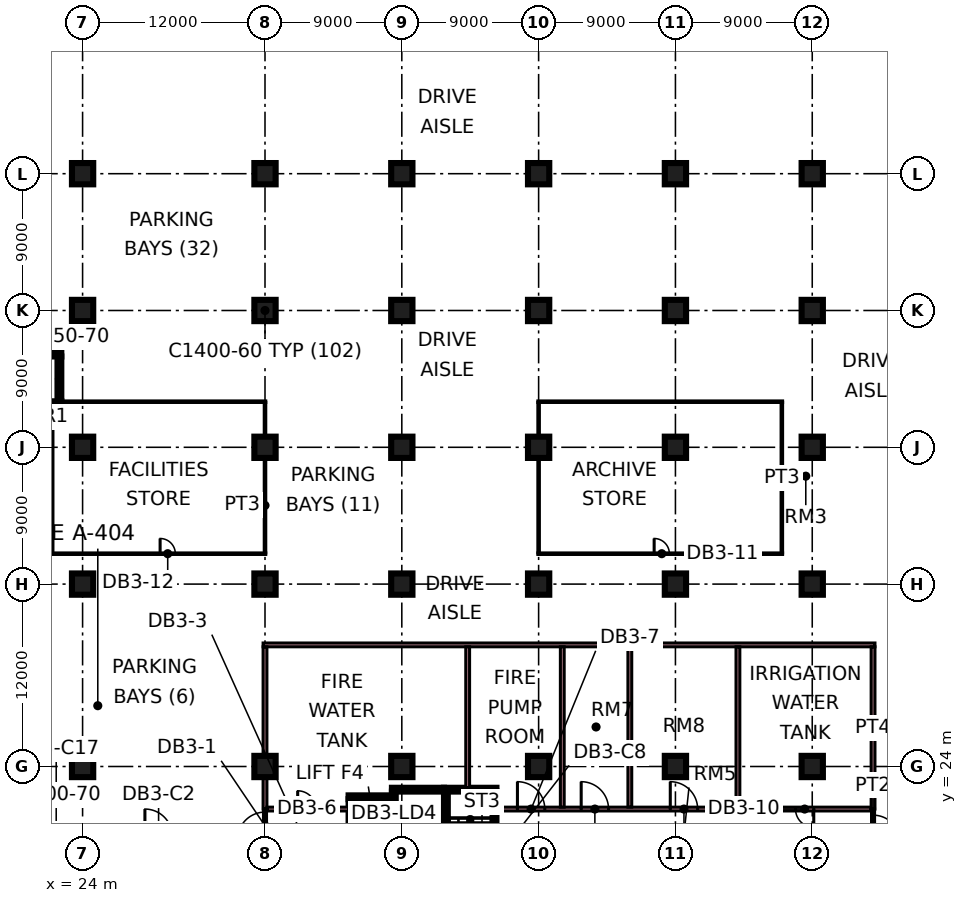
"""IFC4 building model, lengths in metres.
Left out: names, types, materials, properties, quantities, classifications, styles, units other than length and angle.
Written with IfcOpenShell. Run it as: python <this file> out.ifc"""

import sys

from ifc_helpers import new_model, si_unit, direction, frame, frame_2d, origin, origin_2d, place, context, subcontext, project, spatial, rectangle, extrude, element, fill, save


model = new_model("IFC4")
c1 = context("Model", 3, precision=1e-05, world=origin(), true_north=direction((0.0, 1.0)))
c2 = subcontext(c1, "Body", "Model", "MODEL_VIEW")
j1 = project(units=[si_unit("LENGTHUNIT", "METRE"), si_unit("PLANEANGLEUNIT", "RADIAN")], contexts=[c1])
p1 = place(None, origin())
s1 = spatial("IfcSite", under=j1, at=p1, CompositionType="ELEMENT")
p2 = place(p1, origin())
s2 = spatial("IfcBuilding", under=s1, at=p2, CompositionType="ELEMENT")
p3 = place(p2, frame((0.0, 0.0, -13.5)))
s3 = spatial("IfcBuildingStorey", under=s2, at=p3, CompositionType="ELEMENT", Elevation=-13.5)
for number, where, z_axis, x_axis in (
    (1, (24.0, 24.0, 0.0), (0.0, 0.0, 1.0), (1.0, 0.0, 0.0)),
    (2, (24.0, 36.0, 0.0), (0.0, 0.0, 1.0), (1.0, 0.0, 0.0)),
    (3, (24.0, 45.0, 0.0), (0.0, 0.0, 1.0), (1.0, 0.0, 0.0)),
    (4, (24.0, 54.0, 0.0), (0.0, 0.0, 1.0), (1.0, 0.0, 0.0)),
    (5, (24.0, 63.0, 0.0), (0.0, 0.0, 1.0), (1.0, 0.0, 0.0)),
    (6, (36.0, 24.0, 0.0), (0.0, 0.0, 1.0), (1.0, 0.0, 0.0)),
    (7, (36.0, 36.0, 0.0), (0.0, 0.0, 1.0), (1.0, 0.0, 0.0)),
    (8, (36.0, 45.0, 0.0), (0.0, 0.0, 1.0), (1.0, 0.0, 0.0)),
    (9, (36.0, 54.0, 0.0), (0.0, 0.0, 1.0), (1.0, 0.0, 0.0)),
    (10, (36.0, 63.0, 0.0), (0.0, 0.0, 1.0), (1.0, 0.0, 0.0)),
    (11, (45.0, 24.0, 0.0), (0.0, 0.0, 1.0), (1.0, 0.0, 0.0)),
    (12, (45.0, 36.0, 0.0), (0.0, 0.0, 1.0), (1.0, 0.0, 0.0)),
    (13, (45.0, 45.0, 0.0), (0.0, 0.0, 1.0), (1.0, 0.0, 0.0)),
    (14, (45.0, 54.0, 0.0), (0.0, 0.0, 1.0), (1.0, 0.0, 0.0)),
    (15, (45.0, 63.0, 0.0), (0.0, 0.0, 1.0), (1.0, 0.0, 0.0)),
    (16, (54.0, 24.0, 0.0), (0.0, 0.0, 1.0), (1.0, 0.0, 0.0)),
    (17, (54.0, 36.0, 0.0), (0.0, 0.0, 1.0), (1.0, 0.0, 0.0)),
    (18, (54.0, 45.0, 0.0), (0.0, 0.0, 1.0), (1.0, 0.0, 0.0)),
    (19, (54.0, 54.0, 0.0), (0.0, 0.0, 1.0), (1.0, 0.0, 0.0)),
    (20, (54.0, 63.0, 0.0), (0.0, 0.0, 1.0), (1.0, 0.0, 0.0)),
    (21, (63.0, 24.0, 0.0), (0.0, 0.0, 1.0), (1.0, 0.0, 0.0)),
    (22, (63.0, 36.0, 0.0), (0.0, 0.0, 1.0), (1.0, 0.0, 0.0)),
    (23, (63.0, 45.0, 0.0), (0.0, 0.0, 1.0), (1.0, 0.0, 0.0)),
    (24, (63.0, 54.0, 0.0), (0.0, 0.0, 1.0), (1.0, 0.0, 0.0)),
    (25, (63.0, 63.0, 0.0), (0.0, 0.0, 1.0), (1.0, 0.0, 0.0)),
    (26, (72.0, 24.0, 0.0), (0.0, 0.0, 1.0), (1.0, 0.0, 0.0)),
    (27, (72.0, 36.0, 0.0), (0.0, 0.0, 1.0), (1.0, 0.0, 0.0)),
    (28, (72.0, 45.0, 0.0), (0.0, 0.0, 1.0), (1.0, 0.0, 0.0)),
    (29, (72.0, 54.0, 0.0), (0.0, 0.0, 1.0), (1.0, 0.0, 0.0)),
    (30, (72.0, 63.0, 0.0), (0.0, 0.0, 1.0), (1.0, 0.0, 0.0)),
):
    element("IfcColumn", number, at=place(p3, frame(where, z_axis=z_axis, x_axis=x_axis)), inside=s3, PredefinedType="COLUMN", context=c2, shape_type="SweptSolid", body=[
        extrude(rectangle(XDim=1.4, YDim=1.4, at=origin_2d()), origin(), (0.0, 0.0, 1.0), 4.5),
    ])
p4 = place(p3, frame((47.775, 22.475, 0.0), z_axis=(0.0, 0.0, 1.0), x_axis=(1.0, 0.0, 0.0)))
e31 = element("IfcWall", 31, at=p4, inside=s3, PredefinedType="SHEAR", context=c2, shape_type="SweptSolid", body=[
    extrude(rectangle(XDim=3.45, YDim=0.25, at=frame_2d((1.725, 0.0))), origin(), (0.0, 0.0, 1.0), 4.5),
])
p5 = place(p3, frame((47.9, 15.85, 0.0), z_axis=(0.0, 0.0, 1.0), x_axis=(0.0, 1.0, 0.0)))
e32 = element("IfcWall", 32, at=p5, inside=s3, PredefinedType="SHEAR", context=c2, shape_type="SweptSolid", body=[
    extrude(rectangle(XDim=6.5, YDim=0.25, at=frame_2d((3.25, 0.0))), origin(), (0.0, 0.0, 1.0), 4.5),
])
p6 = place(p5, frame((0.35, 0.0, 0.0)))
e33 = element("IfcOpeningElement", 33, at=p6, cuts=e32, PredefinedType="OPENING", context=c2, shape_type="SweptSolid", body=[
    extrude(rectangle(XDim=1.1, YDim=2.2, at=frame_2d((0.55, 1.1))), frame((0.0, 0.135, 0.0), z_axis=(0.0, -1.0, 0.0), x_axis=(1.0, 0.0, 0.0)), (0.0, 0.0, 1.0), 0.27),
])
p7 = place(p3, frame((51.1, 15.85, 0.0), z_axis=(0.0, 0.0, 1.0), x_axis=(0.0, 1.0, 0.0)))
e34 = element("IfcWall", 34, at=p7, inside=s3, PredefinedType="SHEAR", context=c2, shape_type="SweptSolid", body=[
    extrude(rectangle(XDim=6.5, YDim=0.25, at=frame_2d((3.25, 0.0))), origin(), (0.0, 0.0, 1.0), 4.5),
])
for number, where, z_axis, x_axis in (
    (35, (15.6, 47.9, 0.0), (0.0, 0.0, 1.0), (1.0, 0.0, 0.0)),
    (36, (15.6, 51.1, 0.0), (0.0, 0.0, 1.0), (1.0, 0.0, 0.0)),
):
    element("IfcWall", number, at=place(p3, frame(where, z_axis=z_axis, x_axis=x_axis)), inside=s3, PredefinedType="SHEAR", context=c2, shape_type="SweptSolid", body=[
        extrude(rectangle(XDim=7.0, YDim=0.25, at=frame_2d((3.5, 0.0))), origin(), (0.0, 0.0, 1.0), 4.5),
    ])
p8 = place(p3, frame((22.475, 48.025, 0.0), z_axis=(0.0, 0.0, 1.0), x_axis=(0.0, 1.0, 0.0)))
e37 = element("IfcWall", 37, at=p8, inside=s3, PredefinedType="SHEAR", context=c2, shape_type="SweptSolid", body=[
    extrude(rectangle(XDim=2.95, YDim=0.25, at=frame_2d((1.475, 0.0))), origin(), (0.0, 0.0, 1.0), 4.5),
])
p9 = place(p3, frame((44.35, 22.475, 0.0), z_axis=(0.0, 0.0, 1.0), x_axis=(1.0, 0.0, 0.0)))
e38 = element("IfcWall", 38, at=p9, inside=s3, PredefinedType="SHEAR", context=c2, shape_type="SweptSolid", body=[
    extrude(rectangle(XDim=3.425, YDim=0.25, at=frame_2d((1.712, 0.0))), origin(), (0.0, 0.0, 1.0), 4.5),
])
p10 = place(p3, frame((44.475, 15.85, 0.0), z_axis=(0.0, 0.0, 1.0), x_axis=(0.0, 1.0, 0.0)))
e39 = element("IfcWall", 39, at=p10, inside=s3, PredefinedType="SHEAR", context=c2, shape_type="SweptSolid", body=[
    extrude(rectangle(XDim=6.5, YDim=0.25, at=frame_2d((3.25, 0.0))), origin(), (0.0, 0.0, 1.0), 4.5),
])
p11 = place(p10, frame((1.75, 0.0, 0.0)))
e40 = element("IfcOpeningElement", 40, at=p11, cuts=e39, PredefinedType="OPENING", context=c2, shape_type="SweptSolid", body=[
    extrude(rectangle(XDim=1.1, YDim=2.2, at=frame_2d((0.55, 1.1))), frame((0.0, 0.135, 0.0), z_axis=(0.0, -1.0, 0.0), x_axis=(1.0, 0.0, 0.0)), (0.0, 0.0, 1.0), 0.27),
])
p12 = place(p10, frame((4.3, 0.0, 0.0)))
e41 = element("IfcOpeningElement", 41, at=p12, cuts=e39, PredefinedType="OPENING", context=c2, shape_type="SweptSolid", body=[
    extrude(rectangle(XDim=1.1, YDim=2.2, at=frame_2d((0.55, 1.1))), frame((0.0, 0.135, 0.0), z_axis=(0.0, -1.0, 0.0), x_axis=(1.0, 0.0, 0.0)), (0.0, 0.0, 1.0), 0.27),
])
p13 = place(p3, frame((41.5, 21.975, 0.0), z_axis=(0.0, 0.0, 1.0), x_axis=(1.0, 0.0, 0.0)))
e42 = element("IfcWall", 42, at=p13, inside=s3, PredefinedType="SHEAR", context=c2, shape_type="SweptSolid", body=[
    extrude(rectangle(XDim=2.85, YDim=0.25, at=frame_2d((1.425, 0.0))), origin(), (0.0, 0.0, 1.0), 4.5),
])
p14 = place(p3, frame((41.625, 19.55, 0.0), z_axis=(0.0, 0.0, 1.0), x_axis=(0.0, 1.0, 0.0)))
e43 = element("IfcWall", 43, at=p14, inside=s3, PredefinedType="SHEAR", context=c2, shape_type="SweptSolid", body=[
    extrude(rectangle(XDim=2.3, YDim=0.25, at=frame_2d((1.15, 0.0))), origin(), (0.0, 0.0, 1.0), 4.5),
])
p15 = place(p3, frame((21.95, 38.0, 0.0), z_axis=(0.0, 0.0, 1.0), x_axis=(1.0, 0.0, 0.0)))
e44 = element("IfcWall", 44, at=p15, inside=s3, PredefinedType="PARTITIONING", context=c2, shape_type="SweptSolid", body=[
    extrude(rectangle(XDim=14.1, YDim=0.1, at=frame_2d((7.05, 0.0))), origin(), (0.0, 0.0, 1.0), 4.05),
])
p16 = place(p15, frame((7.15, 0.0, 0.0)))
e45 = element("IfcOpeningElement", 45, at=p16, cuts=e44, PredefinedType="OPENING", context=c2, shape_type="SweptSolid", body=[
    extrude(rectangle(XDim=1.0, YDim=2.1, at=frame_2d((0.5, 1.05))), frame((0.0, 0.06, 0.0), z_axis=(0.0, -1.0, 0.0), x_axis=(1.0, 0.0, 0.0)), (0.0, 0.0, 1.0), 0.12),
])
p17 = place(p3, frame((22.0, 38.05, 0.0), z_axis=(0.0, 0.0, 1.0), x_axis=(0.0, 1.0, 0.0)))
e46 = element("IfcWall", 46, at=p17, inside=s3, PredefinedType="PARTITIONING", context=c2, shape_type="SweptSolid", body=[
    extrude(rectangle(XDim=9.725, YDim=0.1, at=frame_2d((4.862, 0.0))), origin(), (0.0, 0.0, 1.0), 4.05),
])
p18 = place(p3, frame((22.6, 48.0, 0.0), z_axis=(0.0, 0.0, 1.0), x_axis=(1.0, 0.0, 0.0)))
e47 = element("IfcWall", 47, at=p18, inside=s3, PredefinedType="PARTITIONING", context=c2, shape_type="SweptSolid", body=[
    extrude(rectangle(XDim=13.45, YDim=0.1, at=frame_2d((6.725, 0.0))), origin(), (0.0, 0.0, 1.0), 4.05),
])
p19 = place(p3, frame((35.875, 32.0, 0.0), z_axis=(0.0, 0.0, 1.0), x_axis=(1.0, 0.0, 0.0)))
e48 = element("IfcWall", 48, at=p19, inside=s3, PredefinedType="PARTITIONING", context=c2, shape_type="SweptSolid", body=[
    extrude(rectangle(XDim=40.25, YDim=0.25, at=frame_2d((20.125, 0.0))), origin(), (0.0, 0.0, 1.0), 4.05),
])
p20 = place(p3, frame((36.0, 18.8, 0.0), z_axis=(0.0, 0.0, 1.0), x_axis=(0.0, 1.0, 0.0)))
e49 = element("IfcWall", 49, at=p20, inside=s3, PredefinedType="PARTITIONING", context=c2, shape_type="SweptSolid", body=[
    extrude(rectangle(XDim=2.4, YDim=0.2, at=frame_2d((1.2, 0.0))), origin(), (0.0, 0.0, 1.0), 4.05),
])
p21 = place(p20, frame((0.4, 0.0, 0.0)))
e50 = element("IfcOpeningElement", 50, at=p21, cuts=e49, PredefinedType="OPENING", context=c2, shape_type="SweptSolid", body=[
    extrude(rectangle(XDim=1.8, YDim=2.1, at=frame_2d((0.9, 1.05))), frame((0.0, 0.11, 0.0), z_axis=(0.0, -1.0, 0.0), x_axis=(1.0, 0.0, 0.0)), (0.0, 0.0, 1.0), 0.22),
])
p22 = place(p3, frame((36.0, 21.2, 0.0), z_axis=(0.0, 0.0, 1.0), x_axis=(0.0, 1.0, 0.0)))
e51 = element("IfcWall", 51, at=p22, inside=s3, PredefinedType="PARTITIONING", context=c2, shape_type="SweptSolid", body=[
    extrude(rectangle(XDim=2.101, YDim=0.25, at=frame_2d((1.051, 0.0))), origin(), (0.0, 0.0, 1.0), 4.05),
])
p23 = place(p3, frame((36.0, 24.699, 0.0), z_axis=(0.0, 0.0, 1.0), x_axis=(0.0, 1.0, 0.0)))
e52 = element("IfcWall", 52, at=p23, inside=s3, PredefinedType="PARTITIONING", context=c2, shape_type="SweptSolid", body=[
    extrude(rectangle(XDim=7.176, YDim=0.25, at=frame_2d((3.588, 0.0))), origin(), (0.0, 0.0, 1.0), 4.05),
])
p24 = place(p3, frame((36.0, 38.05, 0.0), z_axis=(0.0, 0.0, 1.0), x_axis=(0.0, 1.0, 0.0)))
e53 = element("IfcWall", 53, at=p24, inside=s3, PredefinedType="PARTITIONING", context=c2, shape_type="SweptSolid", body=[
    extrude(rectangle(XDim=6.251, YDim=0.1, at=frame_2d((3.125, 0.0))), origin(), (0.0, 0.0, 1.0), 4.05),
])
p25 = place(p3, frame((36.0, 45.699, 0.0), z_axis=(0.0, 0.0, 1.0), x_axis=(0.0, 1.0, 0.0)))
e54 = element("IfcWall", 54, at=p25, inside=s3, PredefinedType="PARTITIONING", context=c2, shape_type="SweptSolid", body=[
    extrude(rectangle(XDim=2.251, YDim=0.1, at=frame_2d((1.125, 0.0))), origin(), (0.0, 0.0, 1.0), 4.05),
])
p26 = place(p3, frame((36.125, 21.2, 0.0), z_axis=(0.0, 0.0, 1.0), x_axis=(1.0, 0.0, 0.0)))
e55 = element("IfcWall", 55, at=p26, inside=s3, PredefinedType="PARTITIONING", context=c2, shape_type="SweptSolid", body=[
    extrude(rectangle(XDim=5.375, YDim=0.25, at=frame_2d((2.688, 0.0))), origin(), (0.0, 0.0, 1.0), 4.05),
])
p27 = place(p26, frame((2.025, 0.0, 0.0)))
e56 = element("IfcOpeningElement", 56, at=p27, cuts=e55, PredefinedType="OPENING", context=c2, shape_type="SweptSolid", body=[
    extrude(rectangle(XDim=1.2, YDim=2.1, at=frame_2d((0.6, 1.05))), frame((0.0, 0.135, 0.0), z_axis=(0.0, -1.0, 0.0), x_axis=(1.0, 0.0, 0.0)), (0.0, 0.0, 1.0), 0.27),
])
p28 = place(p3, frame((49.333, 22.6, 0.0), z_axis=(0.0, 0.0, 1.0), x_axis=(0.0, 1.0, 0.0)))
e57 = element("IfcWall", 57, at=p28, inside=s3, PredefinedType="PARTITIONING", context=c2, shape_type="SweptSolid", body=[
    extrude(rectangle(XDim=9.275, YDim=0.25, at=frame_2d((4.637, 0.0))), origin(), (0.0, 0.0, 1.0), 4.05),
])
p29 = place(p3, frame((51.225, 21.2, 0.0), z_axis=(0.0, 0.0, 1.0), x_axis=(1.0, 0.0, 0.0)))
e58 = element("IfcWall", 58, at=p29, inside=s3, PredefinedType="PARTITIONING", context=c2, shape_type="SweptSolid", body=[
    extrude(rectangle(XDim=24.65, YDim=0.25, at=frame_2d((12.325, 0.0))), origin(), (0.0, 0.0, 1.0), 4.05),
])
p30 = place(p29, frame((1.381, 0.0, 0.0)))
e59 = element("IfcOpeningElement", 59, at=p30, cuts=e58, PredefinedType="OPENING", context=c2, shape_type="SweptSolid", body=[
    extrude(rectangle(XDim=1.8, YDim=2.1, at=frame_2d((0.9, 1.05))), frame((0.0, 0.135, 0.0), z_axis=(0.0, -1.0, 0.0), x_axis=(1.0, 0.0, 0.0)), (0.0, 0.0, 1.0), 0.27),
])
p31 = place(p29, frame((5.575, 0.0, 0.0)))
e60 = element("IfcOpeningElement", 60, at=p31, cuts=e58, PredefinedType="OPENING", context=c2, shape_type="SweptSolid", body=[
    extrude(rectangle(XDim=1.8, YDim=2.1, at=frame_2d((0.9, 1.05))), frame((0.0, 0.135, 0.0), z_axis=(0.0, -1.0, 0.0), x_axis=(1.0, 0.0, 0.0)), (0.0, 0.0, 1.0), 0.27),
])
p32 = place(p29, frame((11.436, 0.0, 0.0)))
e61 = element("IfcOpeningElement", 61, at=p32, cuts=e58, PredefinedType="OPENING", context=c2, shape_type="SweptSolid", body=[
    extrude(rectangle(XDim=1.8, YDim=2.1, at=frame_2d((0.9, 1.05))), frame((0.0, 0.135, 0.0), z_axis=(0.0, -1.0, 0.0), x_axis=(1.0, 0.0, 0.0)), (0.0, 0.0, 1.0), 0.27),
])
p33 = place(p29, frame((19.675, 0.0, 0.0)))
e62 = element("IfcOpeningElement", 62, at=p33, cuts=e58, PredefinedType="OPENING", context=c2, shape_type="SweptSolid", body=[
    extrude(rectangle(XDim=1.2, YDim=2.1, at=frame_2d((0.6, 1.05))), frame((0.0, 0.135, 0.0), z_axis=(0.0, -1.0, 0.0), x_axis=(1.0, 0.0, 0.0)), (0.0, 0.0, 1.0), 0.27),
])
p34 = place(p3, frame((53.95, 38.0, 0.0), z_axis=(0.0, 0.0, 1.0), x_axis=(1.0, 0.0, 0.0)))
e63 = element("IfcWall", 63, at=p34, inside=s3, PredefinedType="PARTITIONING", context=c2, shape_type="SweptSolid", body=[
    extrude(rectangle(XDim=16.1, YDim=0.1, at=frame_2d((8.05, 0.0))), origin(), (0.0, 0.0, 1.0), 4.05),
])
p35 = place(p34, frame((7.65, 0.0, 0.0)))
e64 = element("IfcOpeningElement", 64, at=p35, cuts=e63, PredefinedType="OPENING", context=c2, shape_type="SweptSolid", body=[
    extrude(rectangle(XDim=1.0, YDim=2.1, at=frame_2d((0.5, 1.05))), frame((0.0, 0.06, 0.0), z_axis=(0.0, -1.0, 0.0), x_axis=(1.0, 0.0, 0.0)), (0.0, 0.0, 1.0), 0.12),
])
p36 = place(p3, frame((53.95, 48.0, 0.0), z_axis=(0.0, 0.0, 1.0), x_axis=(1.0, 0.0, 0.0)))
e65 = element("IfcWall", 65, at=p36, inside=s3, PredefinedType="PARTITIONING", context=c2, shape_type="SweptSolid", body=[
    extrude(rectangle(XDim=16.1, YDim=0.1, at=frame_2d((8.05, 0.0))), origin(), (0.0, 0.0, 1.0), 4.05),
])
p37 = place(p3, frame((54.0, 38.05, 0.0), z_axis=(0.0, 0.0, 1.0), x_axis=(0.0, 1.0, 0.0)))
e66 = element("IfcWall", 66, at=p37, inside=s3, PredefinedType="PARTITIONING", context=c2, shape_type="SweptSolid", body=[
    extrude(rectangle(XDim=6.251, YDim=0.1, at=frame_2d((3.125, 0.0))), origin(), (0.0, 0.0, 1.0), 4.05),
])
p38 = place(p3, frame((54.0, 45.699, 0.0), z_axis=(0.0, 0.0, 1.0), x_axis=(0.0, 1.0, 0.0)))
e67 = element("IfcWall", 67, at=p38, inside=s3, PredefinedType="PARTITIONING", context=c2, shape_type="SweptSolid", body=[
    extrude(rectangle(XDim=2.251, YDim=0.1, at=frame_2d((1.125, 0.0))), origin(), (0.0, 0.0, 1.0), 4.05),
])
for number, where, z_axis, x_axis in (
    (68, (55.556, 21.325, 0.0), (0.0, 0.0, 1.0), (0.0, 1.0, 0.0)),
    (69, (60.0, 21.325, 0.0), (0.0, 0.0, 1.0), (0.0, 1.0, 0.0)),
    (70, (67.111, 21.325, 0.0), (0.0, 0.0, 1.0), (0.0, 1.0, 0.0)),
):
    element("IfcWall", number, at=place(p3, frame(where, z_axis=z_axis, x_axis=x_axis)), inside=s3, PredefinedType="PARTITIONING", context=c2, shape_type="SweptSolid", body=[
        extrude(rectangle(XDim=10.55, YDim=0.25, at=frame_2d((5.275, 0.0))), origin(), (0.0, 0.0, 1.0), 4.05),
    ])
p39 = place(p3, frame((70.0, 38.05, 0.0), z_axis=(0.0, 0.0, 1.0), x_axis=(0.0, 1.0, 0.0)))
e71 = element("IfcWall", 71, at=p39, inside=s3, PredefinedType="PARTITIONING", context=c2, shape_type="SweptSolid", body=[
    extrude(rectangle(XDim=9.9, YDim=0.1, at=frame_2d((4.95, 0.0))), origin(), (0.0, 0.0, 1.0), 4.05),
])
p40 = place(p3, frame((76.0, 18.8, 0.0), z_axis=(0.0, 0.0, 1.0), x_axis=(0.0, 1.0, 0.0)))
e72 = element("IfcWall", 72, at=p40, inside=s3, PredefinedType="PARTITIONING", context=c2, shape_type="SweptSolid", body=[
    extrude(rectangle(XDim=2.4, YDim=0.2, at=frame_2d((1.2, 0.0))), origin(), (0.0, 0.0, 1.0), 4.05),
])
p41 = place(p40, frame((0.2, 0.0, 0.0)))
e73 = element("IfcOpeningElement", 73, at=p41, cuts=e72, PredefinedType="OPENING", context=c2, shape_type="SweptSolid", body=[
    extrude(rectangle(XDim=1.8, YDim=2.1, at=frame_2d((0.9, 1.05))), frame((0.0, 0.11, 0.0), z_axis=(0.0, -1.0, 0.0), x_axis=(1.0, 0.0, 0.0)), (0.0, 0.0, 1.0), 0.22),
])
p42 = place(p3, frame((76.0, 21.2, 0.0), z_axis=(0.0, 0.0, 1.0), x_axis=(0.0, 1.0, 0.0)))
e74 = element("IfcWall", 74, at=p42, inside=s3, PredefinedType="PARTITIONING", context=c2, shape_type="SweptSolid", body=[
    extrude(rectangle(XDim=10.675, YDim=0.25, at=frame_2d((5.337, 0.0))), origin(), (0.0, 0.0, 1.0), 4.05),
])
p43 = place(p12, origin())
e75 = element("IfcDoor", 75, at=p43, inside=s3, OperationType="DOUBLE_DOOR_SLIDING", PredefinedType="DOOR", context=c2, shape_type="SweptSolid", body=[
    extrude(rectangle(XDim=1.1, YDim=2.2, at=frame_2d((0.55, 1.1))), frame((0.0, 0.025, 0.0), z_axis=(0.0, -1.0, 0.0), x_axis=(1.0, 0.0, 0.0)), (0.0, 0.0, 1.0), 0.05),
])
fill(e41, e75)
p44 = place(p21, origin())
e76 = element("IfcDoor", 76, at=p44, inside=s3, OperationType="DOUBLE_DOOR_SINGLE_SWING", PredefinedType="DOOR", context=c2, shape_type="SweptSolid", body=[
    extrude(rectangle(XDim=1.8, YDim=2.1, at=frame_2d((0.9, 1.05))), frame((0.0, 0.025, 0.0), z_axis=(0.0, -1.0, 0.0), x_axis=(1.0, 0.0, 0.0)), (0.0, 0.0, 1.0), 0.05),
])
fill(e50, e76)
p45 = place(p41, frame((1.8, 0.0, 0.0), z_axis=(0.0, 0.0, 1.0), x_axis=(-1.0, 0.0, 0.0)))
e77 = element("IfcDoor", 77, at=p45, inside=s3, OperationType="DOUBLE_DOOR_SINGLE_SWING", PredefinedType="DOOR", context=c2, shape_type="SweptSolid", body=[
    extrude(rectangle(XDim=1.8, YDim=2.1, at=frame_2d((0.9, 1.05))), frame((0.0, 0.025, 0.0), z_axis=(0.0, -1.0, 0.0), x_axis=(1.0, 0.0, 0.0)), (0.0, 0.0, 1.0), 0.05),
])
fill(e73, e77)
p46 = place(p27, origin())
e78 = element("IfcDoor", 78, at=p46, inside=s3, OperationType="SINGLE_SWING_LEFT", PredefinedType="DOOR", context=c2, shape_type="SweptSolid", body=[
    extrude(rectangle(XDim=1.2, YDim=2.1, at=frame_2d((0.6, 1.05))), frame((0.0, 0.025, 0.0), z_axis=(0.0, -1.0, 0.0), x_axis=(1.0, 0.0, 0.0)), (0.0, 0.0, 1.0), 0.05),
])
fill(e56, e78)
p47 = place(p30, origin())
e79 = element("IfcDoor", 79, at=p47, inside=s3, OperationType="DOUBLE_DOOR_SINGLE_SWING", PredefinedType="DOOR", context=c2, shape_type="SweptSolid", body=[
    extrude(rectangle(XDim=1.8, YDim=2.1, at=frame_2d((0.9, 1.05))), frame((0.0, 0.025, 0.0), z_axis=(0.0, -1.0, 0.0), x_axis=(1.0, 0.0, 0.0)), (0.0, 0.0, 1.0), 0.05),
])
fill(e59, e79)
p48 = place(p31, origin())
e80 = element("IfcDoor", 80, at=p48, inside=s3, OperationType="DOUBLE_DOOR_SINGLE_SWING", PredefinedType="DOOR", context=c2, shape_type="SweptSolid", body=[
    extrude(rectangle(XDim=1.8, YDim=2.1, at=frame_2d((0.9, 1.05))), frame((0.0, 0.025, 0.0), z_axis=(0.0, -1.0, 0.0), x_axis=(1.0, 0.0, 0.0)), (0.0, 0.0, 1.0), 0.05),
])
fill(e60, e80)
p49 = place(p32, origin())
e81 = element("IfcDoor", 81, at=p49, inside=s3, OperationType="DOUBLE_DOOR_SINGLE_SWING", PredefinedType="DOOR", context=c2, shape_type="SweptSolid", body=[
    extrude(rectangle(XDim=1.8, YDim=2.1, at=frame_2d((0.9, 1.05))), frame((0.0, 0.025, 0.0), z_axis=(0.0, -1.0, 0.0), x_axis=(1.0, 0.0, 0.0)), (0.0, 0.0, 1.0), 0.05),
])
fill(e61, e81)
p50 = place(p33, origin())
e82 = element("IfcDoor", 82, at=p50, inside=s3, OperationType="SINGLE_SWING_RIGHT", PredefinedType="DOOR", context=c2, shape_type="SweptSolid", body=[
    extrude(rectangle(XDim=1.2, YDim=2.1, at=frame_2d((0.6, 1.05))), frame((0.0, 0.025, 0.0), z_axis=(0.0, -1.0, 0.0), x_axis=(1.0, 0.0, 0.0)), (0.0, 0.0, 1.0), 0.05),
])
fill(e62, e82)
p51 = place(p35, origin())
e83 = element("IfcDoor", 83, at=p51, inside=s3, OperationType="SINGLE_SWING_LEFT", PredefinedType="DOOR", context=c2, shape_type="SweptSolid", body=[
    extrude(rectangle(XDim=1.0, YDim=2.1, at=frame_2d((0.5, 1.05))), frame((0.0, 0.025, 0.0), z_axis=(0.0, -1.0, 0.0), x_axis=(1.0, 0.0, 0.0)), (0.0, 0.0, 1.0), 0.05),
])
fill(e64, e83)
p52 = place(p16, origin())
e84 = element("IfcDoor", 84, at=p52, inside=s3, OperationType="SINGLE_SWING_LEFT", PredefinedType="DOOR", context=c2, shape_type="SweptSolid", body=[
    extrude(rectangle(XDim=1.0, YDim=2.1, at=frame_2d((0.5, 1.05))), frame((0.0, 0.025, 0.0), z_axis=(0.0, -1.0, 0.0), x_axis=(1.0, 0.0, 0.0)), (0.0, 0.0, 1.0), 0.05),
])
fill(e45, e84)
save(model, sys.argv[1])
